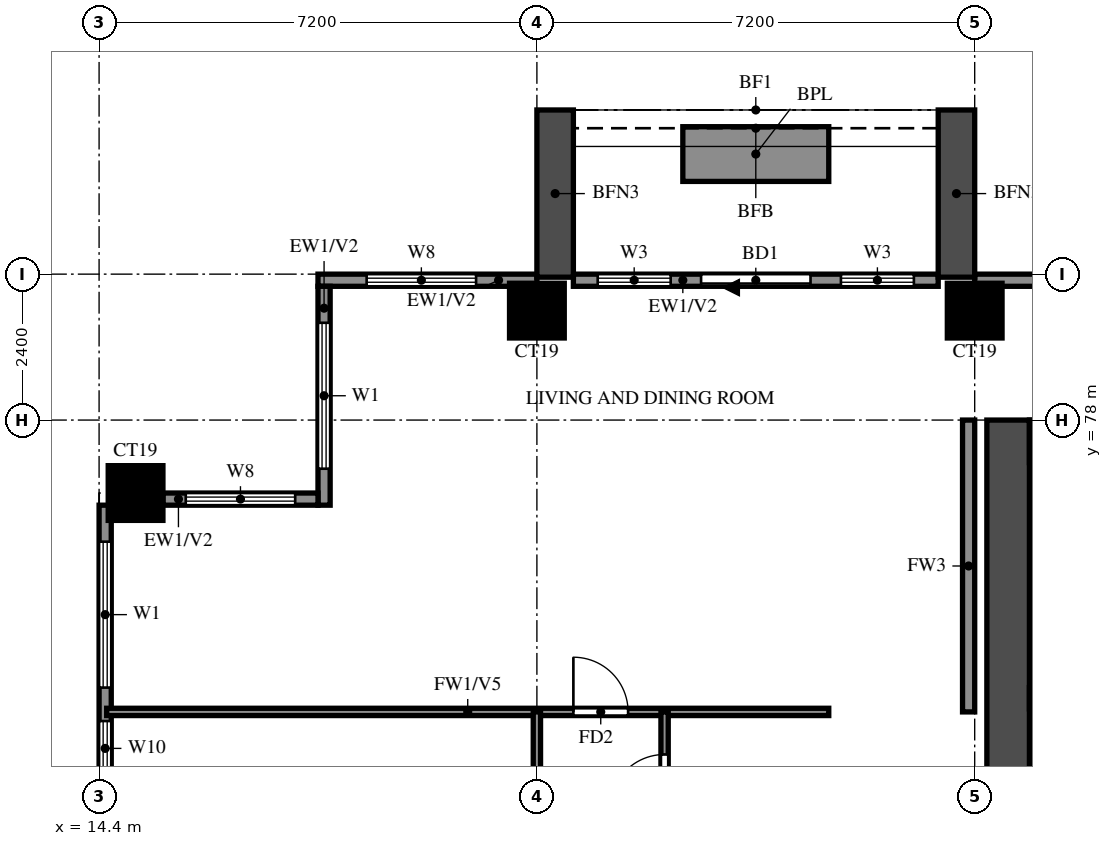
"""IFC4 building model, lengths in metres.
Left out: names, types, materials, properties, quantities, classifications, styles, units other than length and angle.
Written with IfcOpenShell. Run it as: python <this file> out.ifc"""

import sys

from ifc_helpers import new_model, si_unit, direction, frame, frame_2d, origin, origin_2d, place, context, subcontext, project, spatial, rectangle, extrude, source, transform, mapped, element, fill, save


model = new_model("IFC4")
c1 = context("Model", 3, precision=1e-05, world=origin(), true_north=direction((0.0, 1.0)))
c2 = subcontext(c1, "Body", "Model", "MODEL_VIEW")
j1 = project(units=[si_unit("LENGTHUNIT", "METRE"), si_unit("PLANEANGLEUNIT", "RADIAN")], contexts=[c1])
p1 = place(None, origin())
s1 = spatial("IfcSite", under=j1, at=p1, CompositionType="ELEMENT")
p2 = place(p1, origin())
s2 = spatial("IfcBuilding", under=s1, at=p2, CompositionType="ELEMENT")
p3 = place(p2, frame((0.0, 0.0, 127.0)))
s3 = spatial("IfcBuildingStorey", under=s2, at=p3, CompositionType="ELEMENT", Elevation=127.0)
m1 = source(origin(), c2, "Body", "SweptSolid", [
    extrude(rectangle(XDim=0.9, YDim=0.9, at=origin_2d()), origin(), (0.0, 0.0, 1.0), 3.2),
])
for number, where, z_axis, x_axis in (
    (1, (15.0, 76.8, 0.0), (0.0, 0.0, 1.0), (1.0, 0.0, 0.0)),
    (2, (21.6, 79.8, 0.0), (0.0, 0.0, 1.0), (1.0, 0.0, 0.0)),
    (3, (28.8, 79.8, 0.0), (0.0, 0.0, 1.0), (1.0, 0.0, 0.0)),
):
    element("IfcColumn", number, at=place(p3, frame(where, z_axis=z_axis, x_axis=x_axis)), inside=s3, PredefinedType="COLUMN", context=c2, shape_type="MappedRepresentation", body=[
        mapped(m1, transform((0.0, 0.0, 0.0))),
    ])
p4 = place(p3, frame((29.35, 66.1, 0.0), z_axis=(0.0, 0.0, 1.0), x_axis=(0.0, 1.0, 0.0)))
e4 = element("IfcWall", 4, at=p4, inside=s3, PredefinedType="SHEAR", context=c2, shape_type="SweptSolid", body=[
    extrude(rectangle(XDim=11.9, YDim=0.7, at=frame_2d((5.95, 0.0))), origin(), (0.0, 0.0, 1.0), 3.2),
])
p5 = place(p3, frame((29.7, 77.65, 0.0), z_axis=(0.0, 0.0, 1.0), x_axis=(1.0, 0.0, 0.0)))
e5 = element("IfcWall", 5, at=p5, inside=s3, PredefinedType="SHEAR", context=c2, shape_type="SweptSolid", body=[
    extrude(rectangle(XDim=41.4, YDim=0.7, at=frame_2d((20.7, 0.0))), origin(), (0.0, 0.0, 1.0), 3.2),
])
p6 = place(p3, frame((29.7, 73.425, 0.0), z_axis=(0.0, 0.0, 1.0), x_axis=(1.0, 0.0, 0.0)))
e6 = element("IfcWall", 6, at=p6, inside=s3, PredefinedType="SHEAR", context=c2, shape_type="SweptSolid", body=[
    extrude(rectangle(XDim=3.125, YDim=0.35, at=frame_2d((1.562, 0.0))), origin(), (0.0, 0.0, 1.0), 3.2),
])
p7 = place(p3, frame((82.6, 80.3, 0.0), z_axis=(0.0, 0.0, 1.0), x_axis=(-1.0, 0.0, 0.0)))
e7 = element("IfcWall", 7, at=p7, inside=s3, PredefinedType="SOLIDWALL", context=c2, shape_type="SweptSolid", body=[
    extrude(rectangle(XDim=53.8, YDim=0.2, at=frame_2d((26.9, 0.0))), origin(), (0.0, 0.0, 1.0), 3.2),
])
p8 = place(p7, frame((0.7, 0.0, 0.6)))
e8 = element("IfcOpeningElement", 8, at=p8, cuts=e7, PredefinedType="OPENING", context=c2, shape_type="SweptSolid", body=[
    extrude(rectangle(XDim=1.8, YDim=2.4, at=frame_2d((0.9, 1.2))), frame((0.0, 0.11, 0.0), z_axis=(0.0, -1.0, 0.0), x_axis=(1.0, 0.0, 0.0)), (0.0, 0.0, 1.0), 0.22),
])
p9 = place(p7, frame((4.367, 0.0, 0.6)))
e9 = element("IfcOpeningElement", 9, at=p9, cuts=e7, PredefinedType="OPENING", context=c2, shape_type="SweptSolid", body=[
    extrude(rectangle(XDim=2.4, YDim=2.4, at=frame_2d((1.2, 1.2))), frame((0.0, 0.11, 0.0), z_axis=(0.0, -1.0, 0.0), x_axis=(1.0, 0.0, 0.0)), (0.0, 0.0, 1.0), 0.22),
])
p10 = place(p7, frame((7.233, 0.0, 0.6)))
e10 = element("IfcOpeningElement", 10, at=p10, cuts=e7, PredefinedType="OPENING", context=c2, shape_type="SweptSolid", body=[
    extrude(rectangle(XDim=2.4, YDim=2.4, at=frame_2d((1.2, 1.2))), frame((0.0, 0.11, 0.0), z_axis=(0.0, -1.0, 0.0), x_axis=(1.0, 0.0, 0.0)), (0.0, 0.0, 1.0), 0.22),
])
p11 = place(p3, frame((28.2, 80.3, 0.0), z_axis=(0.0, 0.0, 1.0), x_axis=(-1.0, 0.0, 0.0)))
e11 = element("IfcWall", 11, at=p11, inside=s3, PredefinedType="SOLIDWALL", context=c2, shape_type="SweptSolid", body=[
    extrude(rectangle(XDim=6.0, YDim=0.2, at=frame_2d((3.0, 0.0))), origin(), (0.0, 0.0, 1.0), 3.2),
])
p12 = place(p11, frame((2.1, 0.0, 0.0)))
e12 = element("IfcOpeningElement", 12, at=p12, cuts=e11, PredefinedType="OPENING", context=c2, shape_type="SweptSolid", body=[
    extrude(rectangle(XDim=1.8, YDim=2.4, at=frame_2d((0.9, 1.2))), frame((0.0, 0.11, 0.0), z_axis=(0.0, -1.0, 0.0), x_axis=(1.0, 0.0, 0.0)), (0.0, 0.0, 1.0), 0.22),
])
p13 = place(p11, frame((0.4, 0.0, 0.6)))
e13 = element("IfcOpeningElement", 13, at=p13, cuts=e11, PredefinedType="OPENING", context=c2, shape_type="SweptSolid", body=[
    extrude(rectangle(XDim=1.2, YDim=2.4, at=frame_2d((0.6, 1.2))), frame((0.0, 0.11, 0.0), z_axis=(0.0, -1.0, 0.0), x_axis=(1.0, 0.0, 0.0)), (0.0, 0.0, 1.0), 0.22),
])
p14 = place(p11, frame((4.4, 0.0, 0.6)))
e14 = element("IfcOpeningElement", 14, at=p14, cuts=e11, PredefinedType="OPENING", context=c2, shape_type="SweptSolid", body=[
    extrude(rectangle(XDim=1.2, YDim=2.4, at=frame_2d((0.6, 1.2))), frame((0.0, 0.11, 0.0), z_axis=(0.0, -1.0, 0.0), x_axis=(1.0, 0.0, 0.0)), (0.0, 0.0, 1.0), 0.22),
])
p15 = place(p3, frame((21.6, 80.3, 0.0), z_axis=(0.0, 0.0, 1.0), x_axis=(-1.0, 0.0, 0.0)))
e15 = element("IfcWall", 15, at=p15, inside=s3, PredefinedType="SOLIDWALL", context=c2, shape_type="SweptSolid", body=[
    extrude(rectangle(XDim=3.6, YDim=0.2, at=frame_2d((1.8, 0.0))), origin(), (0.0, 0.0, 1.0), 3.2),
])
p16 = place(p15, frame((1.0, 0.0, 0.6)))
e16 = element("IfcOpeningElement", 16, at=p16, cuts=e15, PredefinedType="OPENING", context=c2, shape_type="SweptSolid", body=[
    extrude(rectangle(XDim=1.8, YDim=2.4, at=frame_2d((0.9, 1.2))), frame((0.0, 0.11, 0.0), z_axis=(0.0, -1.0, 0.0), x_axis=(1.0, 0.0, 0.0)), (0.0, 0.0, 1.0), 0.22),
])
p17 = place(p3, frame((18.1, 80.2, 0.0), z_axis=(0.0, 0.0, 1.0), x_axis=(0.0, -1.0, 0.0)))
e17 = element("IfcWall", 17, at=p17, inside=s3, PredefinedType="SOLIDWALL", context=c2, shape_type="SweptSolid", body=[
    extrude(rectangle(XDim=3.6, YDim=0.2, at=frame_2d((1.8, 0.0))), origin(), (0.0, 0.0, 1.0), 3.2),
])
p18 = place(p17, frame((0.6, 0.0, 0.6)))
e18 = element("IfcOpeningElement", 18, at=p18, cuts=e17, PredefinedType="OPENING", context=c2, shape_type="SweptSolid", body=[
    extrude(rectangle(XDim=2.4, YDim=2.4, at=frame_2d((1.2, 1.2))), frame((0.0, 0.11, 0.0), z_axis=(0.0, -1.0, 0.0), x_axis=(1.0, 0.0, 0.0)), (0.0, 0.0, 1.0), 0.22),
])
p19 = place(p3, frame((18.0, 76.7, 0.0), z_axis=(0.0, 0.0, 1.0), x_axis=(-1.0, 0.0, 0.0)))
e19 = element("IfcWall", 19, at=p19, inside=s3, PredefinedType="SOLIDWALL", context=c2, shape_type="SweptSolid", body=[
    extrude(rectangle(XDim=2.55, YDim=0.2, at=frame_2d((1.275, 0.0))), origin(), (0.0, 0.0, 1.0), 3.2),
])
p20 = place(p19, frame((0.375, 0.0, 0.6)))
e20 = element("IfcOpeningElement", 20, at=p20, cuts=e19, PredefinedType="OPENING", context=c2, shape_type="SweptSolid", body=[
    extrude(rectangle(XDim=1.8, YDim=2.4, at=frame_2d((0.9, 1.2))), frame((0.0, 0.11, 0.0), z_axis=(0.0, -1.0, 0.0), x_axis=(1.0, 0.0, 0.0)), (0.0, 0.0, 1.0), 0.22),
])
p21 = place(p3, frame((14.5, 76.6, 0.0), z_axis=(0.0, 0.0, 1.0), x_axis=(0.0, -1.0, 0.0)))
e21 = element("IfcWall", 21, at=p21, inside=s3, PredefinedType="SOLIDWALL", context=c2, shape_type="SweptSolid", body=[
    extrude(rectangle(XDim=33.4, YDim=0.2, at=frame_2d((16.7, 0.0))), origin(), (0.0, 0.0, 1.0), 3.2),
])
p22 = place(p21, frame((7.9, 0.0, 0.0)))
e22 = element("IfcOpeningElement", 22, at=p22, cuts=e21, PredefinedType="OPENING", context=c2, shape_type="SweptSolid", body=[
    extrude(rectangle(XDim=1.8, YDim=2.4, at=frame_2d((0.9, 1.2))), frame((0.0, 0.11, 0.0), z_axis=(0.0, -1.0, 0.0), x_axis=(1.0, 0.0, 0.0)), (0.0, 0.0, 1.0), 0.22),
])
p23 = place(p21, frame((22.3, 0.0, 0.0)))
e23 = element("IfcOpeningElement", 23, at=p23, cuts=e21, PredefinedType="OPENING", context=c2, shape_type="SweptSolid", body=[
    extrude(rectangle(XDim=1.8, YDim=2.4, at=frame_2d((0.9, 1.2))), frame((0.0, 0.11, 0.0), z_axis=(0.0, -1.0, 0.0), x_axis=(1.0, 0.0, 0.0)), (0.0, 0.0, 1.0), 0.22),
])
p24 = place(p21, frame((29.9, 0.0, 0.6)))
e24 = element("IfcOpeningElement", 24, at=p24, cuts=e21, PredefinedType="OPENING", context=c2, shape_type="SweptSolid", body=[
    extrude(rectangle(XDim=2.4, YDim=2.4, at=frame_2d((1.2, 1.2))), frame((0.0, 0.11, 0.0), z_axis=(0.0, -1.0, 0.0), x_axis=(1.0, 0.0, 0.0)), (0.0, 0.0, 1.0), 0.22),
])
p25 = place(p21, frame((24.55, 0.0, 0.6)))
e25 = element("IfcOpeningElement", 25, at=p25, cuts=e21, PredefinedType="OPENING", context=c2, shape_type="SweptSolid", body=[
    extrude(rectangle(XDim=0.9, YDim=2.4, at=frame_2d((0.45, 1.2))), frame((0.0, 0.11, 0.0), z_axis=(0.0, -1.0, 0.0), x_axis=(1.0, 0.0, 0.0)), (0.0, 0.0, 1.0), 0.22),
])
p26 = place(p21, frame((26.3, 0.0, 0.6)))
e26 = element("IfcOpeningElement", 26, at=p26, cuts=e21, PredefinedType="OPENING", context=c2, shape_type="SweptSolid", body=[
    extrude(rectangle(XDim=1.8, YDim=2.4, at=frame_2d((0.9, 1.2))), frame((0.0, 0.11, 0.0), z_axis=(0.0, -1.0, 0.0), x_axis=(1.0, 0.0, 0.0)), (0.0, 0.0, 1.0), 0.22),
])
p27 = place(p21, frame((17.95, 0.0, 0.6)))
e27 = element("IfcOpeningElement", 27, at=p27, cuts=e21, PredefinedType="OPENING", context=c2, shape_type="SweptSolid", body=[
    extrude(rectangle(XDim=0.9, YDim=2.4, at=frame_2d((0.45, 1.2))), frame((0.0, 0.11, 0.0), z_axis=(0.0, -1.0, 0.0), x_axis=(1.0, 0.0, 0.0)), (0.0, 0.0, 1.0), 0.22),
])
p28 = place(p21, frame((19.85, 0.0, 0.6)))
e28 = element("IfcOpeningElement", 28, at=p28, cuts=e21, PredefinedType="OPENING", context=c2, shape_type="SweptSolid", body=[
    extrude(rectangle(XDim=0.9, YDim=2.4, at=frame_2d((0.45, 1.2))), frame((0.0, 0.11, 0.0), z_axis=(0.0, -1.0, 0.0), x_axis=(1.0, 0.0, 0.0)), (0.0, 0.0, 1.0), 0.22),
])
p29 = place(p21, frame((15.3, 0.0, 0.6)))
e29 = element("IfcOpeningElement", 29, at=p29, cuts=e21, PredefinedType="OPENING", context=c2, shape_type="SweptSolid", body=[
    extrude(rectangle(XDim=1.8, YDim=2.4, at=frame_2d((0.9, 1.2))), frame((0.0, 0.11, 0.0), z_axis=(0.0, -1.0, 0.0), x_axis=(1.0, 0.0, 0.0)), (0.0, 0.0, 1.0), 0.22),
])
p30 = place(p21, frame((12.35, 0.0, 1.5)))
e30 = element("IfcOpeningElement", 30, at=p30, cuts=e21, PredefinedType="OPENING", context=c2, shape_type="SweptSolid", body=[
    extrude(rectangle(XDim=0.9, YDim=0.9, at=frame_2d((0.45, 0.45))), frame((0.0, 0.11, 0.0), z_axis=(0.0, -1.0, 0.0), x_axis=(1.0, 0.0, 0.0)), (0.0, 0.0, 1.0), 0.22),
])
p31 = place(p21, frame((3.55, 0.0, 0.6)))
e31 = element("IfcOpeningElement", 31, at=p31, cuts=e21, PredefinedType="OPENING", context=c2, shape_type="SweptSolid", body=[
    extrude(rectangle(XDim=0.9, YDim=2.4, at=frame_2d((0.45, 1.2))), frame((0.0, 0.11, 0.0), z_axis=(0.0, -1.0, 0.0), x_axis=(1.0, 0.0, 0.0)), (0.0, 0.0, 1.0), 0.22),
])
p32 = place(p21, frame((5.3, 0.0, 0.6)))
e32 = element("IfcOpeningElement", 32, at=p32, cuts=e21, PredefinedType="OPENING", context=c2, shape_type="SweptSolid", body=[
    extrude(rectangle(XDim=1.2, YDim=2.4, at=frame_2d((0.6, 1.2))), frame((0.0, 0.11, 0.0), z_axis=(0.0, -1.0, 0.0), x_axis=(1.0, 0.0, 0.0)), (0.0, 0.0, 1.0), 0.22),
])
p33 = place(p21, frame((0.6, 0.0, 0.6)))
e33 = element("IfcOpeningElement", 33, at=p33, cuts=e21, PredefinedType="OPENING", context=c2, shape_type="SweptSolid", body=[
    extrude(rectangle(XDim=2.4, YDim=2.4, at=frame_2d((1.2, 1.2))), frame((0.0, 0.11, 0.0), z_axis=(0.0, -1.0, 0.0), x_axis=(1.0, 0.0, 0.0)), (0.0, 0.0, 1.0), 0.22),
])
for number, where, z_axis, x_axis in (
    (34, (28.5, 80.35, 0.0), (0.0, 0.0, 1.0), (0.0, 1.0, 0.0)),
    (35, (21.9, 80.35, 0.0), (0.0, 0.0, 1.0), (0.0, 1.0, 0.0)),
):
    element("IfcWall", number, at=place(p3, frame(where, z_axis=z_axis, x_axis=x_axis)), inside=s3, PredefinedType="SOLIDWALL", context=c2, shape_type="SweptSolid", body=[
        extrude(rectangle(XDim=2.75, YDim=0.6, at=frame_2d((1.375, 0.0))), origin(), (0.0, 0.0, 1.0), 2.85),
    ])
p34 = place(p3, frame((26.4, 82.375, 0.0), z_axis=(0.0, 0.0, 1.0), x_axis=(-1.0, 0.0, 0.0)))
e36 = element("IfcWall", 36, at=p34, inside=s3, PredefinedType="SOLIDWALL", context=c2, shape_type="SweptSolid", body=[
    extrude(rectangle(XDim=2.4, YDim=0.9, at=frame_2d((1.2, 0.0))), origin(), (0.0, 0.0, 1.0), 0.9),
])
p35 = place(p3, frame((28.7, 73.2, 0.0), z_axis=(0.0, 0.0, 1.0), x_axis=(0.0, 1.0, 0.0)))
e37 = element("IfcWall", 37, at=p35, inside=s3, PredefinedType="SOLIDWALL", context=c2, shape_type="SweptSolid", body=[
    extrude(rectangle(XDim=4.8, YDim=0.2, at=frame_2d((2.4, 0.0))), origin(), (0.0, 0.0, 1.0), 3.2),
])
p36 = place(p3, frame((14.525, 73.2, 0.0), z_axis=(0.0, 0.0, 1.0), x_axis=(1.0, 0.0, 0.0)))
e38 = element("IfcWall", 38, at=p36, inside=s3, PredefinedType="PARTITIONING", context=c2, shape_type="SweptSolid", body=[
    extrude(rectangle(XDim=11.875, YDim=0.12, at=frame_2d((5.938, 0.0))), origin(), (0.0, 0.0, 1.0), 2.3),
])
p37 = place(p36, frame((7.675, 0.0, 0.0)))
e39 = element("IfcOpeningElement", 39, at=p37, cuts=e38, PredefinedType="OPENING", context=c2, shape_type="SweptSolid", body=[
    extrude(rectangle(XDim=0.9, YDim=2.1, at=frame_2d((0.45, 1.05))), frame((0.0, 0.07, 0.0), z_axis=(0.0, -1.0, 0.0), x_axis=(1.0, 0.0, 0.0)), (0.0, 0.0, 1.0), 0.14),
])
p38 = place(p3, frame((21.6, 66.0, 0.0), z_axis=(0.0, 0.0, 1.0), x_axis=(0.0, 1.0, 0.0)))
e40 = element("IfcWall", 40, at=p38, inside=s3, PredefinedType="PARTITIONING", context=c2, shape_type="SweptSolid", body=[
    extrude(rectangle(XDim=7.2, YDim=0.12, at=frame_2d((3.6, 0.0))), origin(), (0.0, 0.0, 1.0), 3.2),
])
p39 = place(p38, frame((1.35, 0.0, 0.0)))
e41 = element("IfcOpeningElement", 41, at=p39, cuts=e40, PredefinedType="OPENING", context=c2, shape_type="SweptSolid", body=[
    extrude(rectangle(XDim=0.9, YDim=2.1, at=frame_2d((0.45, 1.05))), frame((0.0, 0.07, 0.0), z_axis=(0.0, -1.0, 0.0), x_axis=(1.0, 0.0, 0.0)), (0.0, 0.0, 1.0), 0.14),
])
p40 = place(p38, frame((4.95, 0.0, 0.0)))
e42 = element("IfcOpeningElement", 42, at=p40, cuts=e40, PredefinedType="OPENING", context=c2, shape_type="SweptSolid", body=[
    extrude(rectangle(XDim=0.9, YDim=2.1, at=frame_2d((0.45, 1.05))), frame((0.0, 0.07, 0.0), z_axis=(0.0, -1.0, 0.0), x_axis=(1.0, 0.0, 0.0)), (0.0, 0.0, 1.0), 0.14),
])
p41 = place(p3, frame((23.7, 61.2, 0.0), z_axis=(0.0, 0.0, 1.0), x_axis=(0.0, 1.0, 0.0)))
e43 = element("IfcWall", 43, at=p41, inside=s3, PredefinedType="PARTITIONING", context=c2, shape_type="SweptSolid", body=[
    extrude(rectangle(XDim=12.0, YDim=0.12, at=frame_2d((6.0, 0.0))), origin(), (0.0, 0.0, 1.0), 3.2),
])
p42 = place(p41, frame((1.875, 0.0, 0.0)))
e44 = element("IfcOpeningElement", 44, at=p42, cuts=e43, PredefinedType="OPENING", context=c2, shape_type="SweptSolid", body=[
    extrude(rectangle(XDim=0.9, YDim=2.1, at=frame_2d((0.45, 1.05))), frame((0.0, 0.07, 0.0), z_axis=(0.0, -1.0, 0.0), x_axis=(1.0, 0.0, 0.0)), (0.0, 0.0, 1.0), 0.14),
])
p43 = place(p41, frame((5.45, 0.0, 0.0)))
e45 = element("IfcOpeningElement", 45, at=p43, cuts=e43, PredefinedType="OPENING", context=c2, shape_type="SweptSolid", body=[
    extrude(rectangle(XDim=0.8, YDim=2.1, at=frame_2d((0.4, 1.05))), frame((0.0, 0.07, 0.0), z_axis=(0.0, -1.0, 0.0), x_axis=(1.0, 0.0, 0.0)), (0.0, 0.0, 1.0), 0.14),
])
p44 = place(p41, frame((7.975, 0.0, 0.0)))
e46 = element("IfcOpeningElement", 46, at=p44, cuts=e43, PredefinedType="OPENING", context=c2, shape_type="SweptSolid", body=[
    extrude(rectangle(XDim=0.8, YDim=2.1, at=frame_2d((0.4, 1.05))), frame((0.0, 0.07, 0.0), z_axis=(0.0, -1.0, 0.0), x_axis=(1.0, 0.0, 0.0)), (0.0, 0.0, 1.0), 0.14),
])
p45 = place(p41, frame((10.4, 0.0, 0.0)))
e47 = element("IfcOpeningElement", 47, at=p45, cuts=e43, PredefinedType="OPENING", context=c2, shape_type="SweptSolid", body=[
    extrude(rectangle(XDim=0.9, YDim=2.1, at=frame_2d((0.45, 1.05))), frame((0.0, 0.07, 0.0), z_axis=(0.0, -1.0, 0.0), x_axis=(1.0, 0.0, 0.0)), (0.0, 0.0, 1.0), 0.14),
])
p46 = place(p12, origin())
e48 = element("IfcDoor", 48, at=p46, inside=s3, OperationType="DOUBLE_DOOR_SLIDING", PredefinedType="DOOR", context=c2, shape_type="SweptSolid", body=[
    extrude(rectangle(XDim=1.8, YDim=2.4, at=frame_2d((0.9, 1.2))), frame((0.0, 0.025, 0.0), z_axis=(0.0, -1.0, 0.0), x_axis=(1.0, 0.0, 0.0)), (0.0, 0.0, 1.0), 0.05),
])
fill(e12, e48)
p47 = place(p13, origin())
e49 = element("IfcWindow", 49, at=p47, inside=s3, PartitioningType="SINGLE_PANEL", PredefinedType="WINDOW", context=c2, shape_type="SweptSolid", body=[
    extrude(rectangle(XDim=1.2, YDim=2.4, at=frame_2d((0.6, 1.2))), frame((0.0, 0.03, 0.0), z_axis=(0.0, -1.0, 0.0), x_axis=(1.0, 0.0, 0.0)), (0.0, 0.0, 1.0), 0.06),
])
fill(e13, e49)
p48 = place(p14, origin())
e50 = element("IfcWindow", 50, at=p48, inside=s3, PartitioningType="SINGLE_PANEL", PredefinedType="WINDOW", context=c2, shape_type="SweptSolid", body=[
    extrude(rectangle(XDim=1.2, YDim=2.4, at=frame_2d((0.6, 1.2))), frame((0.0, 0.03, 0.0), z_axis=(0.0, -1.0, 0.0), x_axis=(1.0, 0.0, 0.0)), (0.0, 0.0, 1.0), 0.06),
])
fill(e14, e50)
p49 = place(p16, origin())
e51 = element("IfcWindow", 51, at=p49, inside=s3, PartitioningType="DOUBLE_PANEL_VERTICAL", PredefinedType="WINDOW", context=c2, shape_type="SweptSolid", body=[
    extrude(rectangle(XDim=1.8, YDim=2.4, at=frame_2d((0.9, 1.2))), frame((0.0, 0.03, 0.0), z_axis=(0.0, -1.0, 0.0), x_axis=(1.0, 0.0, 0.0)), (0.0, 0.0, 1.0), 0.06),
])
fill(e16, e51)
p50 = place(p18, origin())
e52 = element("IfcWindow", 52, at=p50, inside=s3, PartitioningType="DOUBLE_PANEL_VERTICAL", PredefinedType="WINDOW", context=c2, shape_type="SweptSolid", body=[
    extrude(rectangle(XDim=2.4, YDim=2.4, at=frame_2d((1.2, 1.2))), frame((0.0, 0.03, 0.0), z_axis=(0.0, -1.0, 0.0), x_axis=(1.0, 0.0, 0.0)), (0.0, 0.0, 1.0), 0.06),
])
fill(e18, e52)
p51 = place(p20, origin())
e53 = element("IfcWindow", 53, at=p51, inside=s3, PartitioningType="DOUBLE_PANEL_VERTICAL", PredefinedType="WINDOW", context=c2, shape_type="SweptSolid", body=[
    extrude(rectangle(XDim=1.8, YDim=2.4, at=frame_2d((0.9, 1.2))), frame((0.0, 0.03, 0.0), z_axis=(0.0, -1.0, 0.0), x_axis=(1.0, 0.0, 0.0)), (0.0, 0.0, 1.0), 0.06),
])
fill(e20, e53)
p52 = place(p31, origin())
e54 = element("IfcWindow", 54, at=p52, inside=s3, PartitioningType="SINGLE_PANEL", PredefinedType="WINDOW", context=c2, shape_type="SweptSolid", body=[
    extrude(rectangle(XDim=0.9, YDim=2.4, at=frame_2d((0.45, 1.2))), frame((0.0, 0.03, 0.0), z_axis=(0.0, -1.0, 0.0), x_axis=(1.0, 0.0, 0.0)), (0.0, 0.0, 1.0), 0.06),
])
fill(e31, e54)
p53 = place(p33, origin())
e55 = element("IfcWindow", 55, at=p53, inside=s3, PartitioningType="DOUBLE_PANEL_VERTICAL", PredefinedType="WINDOW", context=c2, shape_type="SweptSolid", body=[
    extrude(rectangle(XDim=2.4, YDim=2.4, at=frame_2d((1.2, 1.2))), frame((0.0, 0.03, 0.0), z_axis=(0.0, -1.0, 0.0), x_axis=(1.0, 0.0, 0.0)), (0.0, 0.0, 1.0), 0.06),
])
fill(e33, e55)
p54 = place(p37, origin())
e56 = element("IfcDoor", 56, at=p54, inside=s3, OperationType="SINGLE_SWING_LEFT", PredefinedType="DOOR", context=c2, shape_type="SweptSolid", body=[
    extrude(rectangle(XDim=0.9, YDim=2.1, at=frame_2d((0.45, 1.05))), frame((0.0, 0.025, 0.0), z_axis=(0.0, -1.0, 0.0), x_axis=(1.0, 0.0, 0.0)), (0.0, 0.0, 1.0), 0.05),
])
fill(e39, e56)
p55 = place(p45, origin())
e57 = element("IfcDoor", 57, at=p55, inside=s3, OperationType="SINGLE_SWING_RIGHT", PredefinedType="DOOR", context=c2, shape_type="SweptSolid", body=[
    extrude(rectangle(XDim=0.9, YDim=2.1, at=frame_2d((0.45, 1.05))), frame((0.0, 0.025, 0.0), z_axis=(0.0, -1.0, 0.0), x_axis=(1.0, 0.0, 0.0)), (0.0, 0.0, 1.0), 0.05),
])
fill(e47, e57)
save(model, sys.argv[1])
